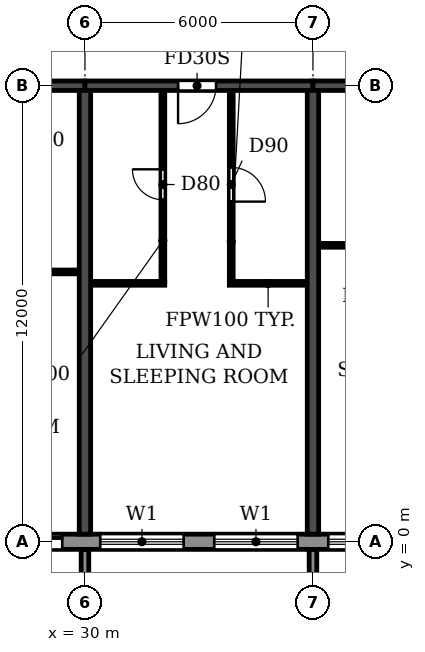
"""IFC4 building model, lengths in metres.
Left out: names, types, materials, properties, quantities, classifications, styles, units other than length and angle.
Written with IfcOpenShell. Run it as: python <this file> out.ifc"""

import sys

from ifc_helpers import new_model, si_unit, direction, frame, frame_2d, origin, place, context, subcontext, project, spatial, polyline, rectangle, outline, extrude, source, transform, mapped, element, fill, save


model = new_model("IFC4")
c1 = context("Model", 3, precision=1e-05, world=origin(), true_north=direction((0.0, 1.0)))
c2 = subcontext(c1, "Body", "Model", "MODEL_VIEW")
j1 = project(units=[si_unit("LENGTHUNIT", "METRE"), si_unit("PLANEANGLEUNIT", "RADIAN")], contexts=[c1])
p1 = place(None, origin())
s1 = spatial("IfcSite", under=j1, at=p1, CompositionType="ELEMENT")
p2 = place(p1, origin())
s2 = spatial("IfcBuilding", under=s1, at=p2, CompositionType="ELEMENT")
p3 = place(p2, frame((0.0, 0.0, 162.0)))
s3 = spatial("IfcBuildingStorey", under=s2, at=p3, CompositionType="ELEMENT", Elevation=162.0)
for number, where, z_axis, x_axis in (
    (1, (30.0, 0.2, 0.0), (0.0, 0.0, 1.0), (0.0, 1.0, 0.0)),
    (2, (36.0, 0.2, 0.0), (0.0, 0.0, 1.0), (0.0, 1.0, 0.0)),
):
    element("IfcWall", number, at=place(p3, frame(where, z_axis=z_axis, x_axis=x_axis)), inside=s3, PredefinedType="SHEAR", context=c2, shape_type="SweptSolid", body=[
        extrude(rectangle(XDim=11.675, YDim=0.3, at=frame_2d((5.837, 0.0))), origin(), (0.0, 0.0, 1.0), 2.95),
    ])
p4 = place(p3, frame((24.0, 12.0, 0.0), z_axis=(0.0, 0.0, 1.0), x_axis=(1.0, 0.0, 0.0)))
e3 = element("IfcWall", 3, at=p4, inside=s3, PredefinedType="SHEAR", context=c2, shape_type="SweptSolid", body=[
    extrude(rectangle(XDim=6.0, YDim=0.25, at=frame_2d((3.0, 0.0))), origin(), (0.0, 0.0, 1.0), 2.35),
])
p5 = place(p4, frame((2.55, 0.0, 0.0)))
e4 = element("IfcOpeningElement", 4, at=p5, cuts=e3, PredefinedType="OPENING", context=c2, shape_type="SweptSolid", body=[
    extrude(rectangle(XDim=1.0, YDim=2.1, at=frame_2d((0.5, 1.05))), frame((0.0, 0.135, 0.0), z_axis=(0.0, -1.0, 0.0), x_axis=(1.0, 0.0, 0.0)), (0.0, 0.0, 1.0), 0.27),
])
p6 = place(p3, frame((30.0, 12.0, 0.0), z_axis=(0.0, 0.0, 1.0), x_axis=(1.0, 0.0, 0.0)))
e5 = element("IfcWall", 5, at=p6, inside=s3, PredefinedType="SHEAR", context=c2, shape_type="SweptSolid", body=[
    extrude(rectangle(XDim=6.0, YDim=0.25, at=frame_2d((3.0, 0.0))), origin(), (0.0, 0.0, 1.0), 2.35),
])
p7 = place(p6, frame((2.45, 0.0, 0.0)))
e6 = element("IfcOpeningElement", 6, at=p7, cuts=e5, PredefinedType="OPENING", context=c2, shape_type="SweptSolid", body=[
    extrude(rectangle(XDim=1.0, YDim=2.1, at=frame_2d((0.5, 1.05))), frame((0.0, 0.135, 0.0), z_axis=(0.0, -1.0, 0.0), x_axis=(1.0, 0.0, 0.0)), (0.0, 0.0, 1.0), 0.27),
])
p8 = place(p3, frame((36.0, 12.0, 0.0), z_axis=(0.0, 0.0, 1.0), x_axis=(1.0, 0.0, 0.0)))
e7 = element("IfcWall", 7, at=p8, inside=s3, PredefinedType="SHEAR", context=c2, shape_type="SweptSolid", body=[
    extrude(rectangle(XDim=6.0, YDim=0.25, at=frame_2d((3.0, 0.0))), origin(), (0.0, 0.0, 1.0), 2.35),
])
p9 = place(p8, frame((2.45, 0.0, 0.0)))
e8 = element("IfcOpeningElement", 8, at=p9, cuts=e7, PredefinedType="OPENING", context=c2, shape_type="SweptSolid", body=[
    extrude(rectangle(XDim=1.0, YDim=2.1, at=frame_2d((0.5, 1.05))), frame((0.0, 0.135, 0.0), z_axis=(0.0, -1.0, 0.0), x_axis=(1.0, 0.0, 0.0)), (0.0, 0.0, 1.0), 0.27),
])
p10 = place(p3, frame((22.683, 0.0, 0.0), z_axis=(0.0, 0.0, 1.0), x_axis=(1.0, 0.0, 0.0)))
e9 = element("IfcWall", 9, at=p10, inside=s3, PredefinedType="STANDARD", context=c2, shape_type="SweptSolid", body=[
    extrude(rectangle(XDim=56.634, YDim=0.4, at=frame_2d((28.317, 0.0))), origin(), (0.0, 0.0, 1.0), 2.95),
])
p11 = place(p10, frame((1.717, 0.0, 0.9)))
e10 = element("IfcOpeningElement", 10, at=p11, cuts=e9, PredefinedType="OPENING", context=c2, shape_type="SweptSolid", body=[
    extrude(rectangle(XDim=2.2, YDim=1.5, at=frame_2d((1.1, 0.75))), frame((0.0, 0.21, 0.0), z_axis=(0.0, -1.0, 0.0), x_axis=(1.0, 0.0, 0.0)), (0.0, 0.0, 1.0), 0.42),
])
p12 = place(p10, frame((4.917, 0.0, 0.0)))
e11 = element("IfcOpeningElement", 11, at=p12, cuts=e9, PredefinedType="OPENING", context=c2, shape_type="SweptSolid", body=[
    extrude(rectangle(XDim=1.8, YDim=2.4, at=frame_2d((0.9, 1.2))), frame((0.0, 0.21, 0.0), z_axis=(0.0, -1.0, 0.0), x_axis=(1.0, 0.0, 0.0)), (0.0, 0.0, 1.0), 0.42),
])
p13 = place(p10, frame((7.717, 0.0, 0.9)))
e12 = element("IfcOpeningElement", 12, at=p13, cuts=e9, PredefinedType="OPENING", context=c2, shape_type="SweptSolid", body=[
    extrude(rectangle(XDim=2.2, YDim=1.5, at=frame_2d((1.1, 0.75))), frame((0.0, 0.21, 0.0), z_axis=(0.0, -1.0, 0.0), x_axis=(1.0, 0.0, 0.0)), (0.0, 0.0, 1.0), 0.42),
])
p14 = place(p10, frame((10.717, 0.0, 0.9)))
e13 = element("IfcOpeningElement", 13, at=p14, cuts=e9, PredefinedType="OPENING", context=c2, shape_type="SweptSolid", body=[
    extrude(rectangle(XDim=2.2, YDim=1.5, at=frame_2d((1.1, 0.75))), frame((0.0, 0.21, 0.0), z_axis=(0.0, -1.0, 0.0), x_axis=(1.0, 0.0, 0.0)), (0.0, 0.0, 1.0), 0.42),
])
p15 = place(p10, frame((13.717, 0.0, 0.9)))
e14 = element("IfcOpeningElement", 14, at=p15, cuts=e9, PredefinedType="OPENING", context=c2, shape_type="SweptSolid", body=[
    extrude(rectangle(XDim=2.2, YDim=1.5, at=frame_2d((1.1, 0.75))), frame((0.0, 0.21, 0.0), z_axis=(0.0, -1.0, 0.0), x_axis=(1.0, 0.0, 0.0)), (0.0, 0.0, 1.0), 0.42),
])
p16 = place(p10, frame((16.917, 0.0, 0.0)))
e15 = element("IfcOpeningElement", 15, at=p16, cuts=e9, PredefinedType="OPENING", context=c2, shape_type="SweptSolid", body=[
    extrude(rectangle(XDim=1.8, YDim=2.4, at=frame_2d((0.9, 1.2))), frame((0.0, 0.21, 0.0), z_axis=(0.0, -1.0, 0.0), x_axis=(1.0, 0.0, 0.0)), (0.0, 0.0, 1.0), 0.42),
])
p17 = place(p10, frame((19.717, 0.0, 0.9)))
e16 = element("IfcOpeningElement", 16, at=p17, cuts=e9, PredefinedType="OPENING", context=c2, shape_type="SweptSolid", body=[
    extrude(rectangle(XDim=2.2, YDim=1.5, at=frame_2d((1.1, 0.75))), frame((0.0, 0.21, 0.0), z_axis=(0.0, -1.0, 0.0), x_axis=(1.0, 0.0, 0.0)), (0.0, 0.0, 1.0), 0.42),
])
p18 = place(p10, frame((22.717, 0.0, 0.9)))
e17 = element("IfcOpeningElement", 17, at=p18, cuts=e9, PredefinedType="OPENING", context=c2, shape_type="SweptSolid", body=[
    extrude(rectangle(XDim=2.2, YDim=1.5, at=frame_2d((1.1, 0.75))), frame((0.0, 0.21, 0.0), z_axis=(0.0, -1.0, 0.0), x_axis=(1.0, 0.0, 0.0)), (0.0, 0.0, 1.0), 0.42),
])
p19 = place(p10, frame((25.717, 0.0, 0.9)))
e18 = element("IfcOpeningElement", 18, at=p19, cuts=e9, PredefinedType="OPENING", context=c2, shape_type="SweptSolid", body=[
    extrude(rectangle(XDim=2.2, YDim=1.5, at=frame_2d((1.1, 0.75))), frame((0.0, 0.21, 0.0), z_axis=(0.0, -1.0, 0.0), x_axis=(1.0, 0.0, 0.0)), (0.0, 0.0, 1.0), 0.42),
])
p20 = place(p10, frame((28.717, 0.0, 0.9)))
e19 = element("IfcOpeningElement", 19, at=p20, cuts=e9, PredefinedType="OPENING", context=c2, shape_type="SweptSolid", body=[
    extrude(rectangle(XDim=2.2, YDim=1.5, at=frame_2d((1.1, 0.75))), frame((0.0, 0.21, 0.0), z_axis=(0.0, -1.0, 0.0), x_axis=(1.0, 0.0, 0.0)), (0.0, 0.0, 1.0), 0.42),
])
p21 = place(p10, frame((31.717, 0.0, 0.9)))
e20 = element("IfcOpeningElement", 20, at=p21, cuts=e9, PredefinedType="OPENING", context=c2, shape_type="SweptSolid", body=[
    extrude(rectangle(XDim=2.2, YDim=1.5, at=frame_2d((1.1, 0.75))), frame((0.0, 0.21, 0.0), z_axis=(0.0, -1.0, 0.0), x_axis=(1.0, 0.0, 0.0)), (0.0, 0.0, 1.0), 0.42),
])
p22 = place(p10, frame((34.717, 0.0, 0.9)))
e21 = element("IfcOpeningElement", 21, at=p22, cuts=e9, PredefinedType="OPENING", context=c2, shape_type="SweptSolid", body=[
    extrude(rectangle(XDim=2.2, YDim=1.5, at=frame_2d((1.1, 0.75))), frame((0.0, 0.21, 0.0), z_axis=(0.0, -1.0, 0.0), x_axis=(1.0, 0.0, 0.0)), (0.0, 0.0, 1.0), 0.42),
])
p23 = place(p10, frame((37.717, 0.0, 0.9)))
e22 = element("IfcOpeningElement", 22, at=p23, cuts=e9, PredefinedType="OPENING", context=c2, shape_type="SweptSolid", body=[
    extrude(rectangle(XDim=2.2, YDim=1.5, at=frame_2d((1.1, 0.75))), frame((0.0, 0.21, 0.0), z_axis=(0.0, -1.0, 0.0), x_axis=(1.0, 0.0, 0.0)), (0.0, 0.0, 1.0), 0.42),
])
p24 = place(p10, frame((40.717, 0.0, 0.9)))
e23 = element("IfcOpeningElement", 23, at=p24, cuts=e9, PredefinedType="OPENING", context=c2, shape_type="SweptSolid", body=[
    extrude(rectangle(XDim=2.2, YDim=1.5, at=frame_2d((1.1, 0.75))), frame((0.0, 0.21, 0.0), z_axis=(0.0, -1.0, 0.0), x_axis=(1.0, 0.0, 0.0)), (0.0, 0.0, 1.0), 0.42),
])
p25 = place(p10, frame((43.717, 0.0, 0.9)))
e24 = element("IfcOpeningElement", 24, at=p25, cuts=e9, PredefinedType="OPENING", context=c2, shape_type="SweptSolid", body=[
    extrude(rectangle(XDim=2.2, YDim=1.5, at=frame_2d((1.1, 0.75))), frame((0.0, 0.21, 0.0), z_axis=(0.0, -1.0, 0.0), x_axis=(1.0, 0.0, 0.0)), (0.0, 0.0, 1.0), 0.42),
])
p26 = place(p10, frame((46.717, 0.0, 0.9)))
e25 = element("IfcOpeningElement", 25, at=p26, cuts=e9, PredefinedType="OPENING", context=c2, shape_type="SweptSolid", body=[
    extrude(rectangle(XDim=2.2, YDim=1.5, at=frame_2d((1.1, 0.75))), frame((0.0, 0.21, 0.0), z_axis=(0.0, -1.0, 0.0), x_axis=(1.0, 0.0, 0.0)), (0.0, 0.0, 1.0), 0.42),
])
p27 = place(p10, frame((49.917, 0.0, 0.0)))
e26 = element("IfcOpeningElement", 26, at=p27, cuts=e9, PredefinedType="OPENING", context=c2, shape_type="SweptSolid", body=[
    extrude(rectangle(XDim=1.8, YDim=2.4, at=frame_2d((0.9, 1.2))), frame((0.0, 0.21, 0.0), z_axis=(0.0, -1.0, 0.0), x_axis=(1.0, 0.0, 0.0)), (0.0, 0.0, 1.0), 0.42),
])
p28 = place(p10, frame((52.717, 0.0, 0.9)))
e27 = element("IfcOpeningElement", 27, at=p28, cuts=e9, PredefinedType="OPENING", context=c2, shape_type="SweptSolid", body=[
    extrude(rectangle(XDim=2.2, YDim=1.5, at=frame_2d((1.1, 0.75))), frame((0.0, 0.21, 0.0), z_axis=(0.0, -1.0, 0.0), x_axis=(1.0, 0.0, 0.0)), (0.0, 0.0, 1.0), 0.42),
])
m1 = source(origin(), c2, "Body", "SweptSolid", [
    extrude(outline(polyline([(0.0, 0.0), (0.2, 0.0), (0.2, 1.65), (0.0, 1.65), (0.0, 0.0)])), origin(), (0.0, 0.0, 1.0), 3.1),
])
for number, where in (
    (28, (29.9, -1.85, 0.0)),
    (29, (35.9, -1.85, 0.0)),
):
    element("IfcWall", number, at=place(p3, frame(where)), inside=s3, PredefinedType="STANDARD", context=c2, shape_type="MappedRepresentation", body=[
        mapped(m1, transform((0.0, 0.0, 0.0))),
    ])
p29 = place(p3, frame((30.16, 6.8, 0.0), z_axis=(0.0, 0.0, 1.0), x_axis=(1.0, 0.0, 0.0)))
e30 = element("IfcWall", 30, at=p29, inside=s3, PredefinedType="PARTITIONING", context=c2, shape_type="SweptSolid", body=[
    extrude(rectangle(XDim=1.94, YDim=0.1, at=frame_2d((0.97, 0.0))), origin(), (0.0, 0.0, 1.0), 2.95),
])
p30 = place(p3, frame((33.8, 6.8, 0.0), z_axis=(0.0, 0.0, 1.0), x_axis=(1.0, 0.0, 0.0)))
e31 = element("IfcWall", 31, at=p30, inside=s3, PredefinedType="PARTITIONING", context=c2, shape_type="SweptSolid", body=[
    extrude(rectangle(XDim=2.04, YDim=0.1, at=frame_2d((1.02, 0.0))), origin(), (0.0, 0.0, 1.0), 2.95),
])
for number, where, z_axis, x_axis in (
    (32, (27.9, 7.1, 0.0), (0.0, 0.0, 1.0), (1.0, 0.0, 0.0)),
    (33, (36.16, 7.8, 0.0), (0.0, 0.0, 1.0), (1.0, 0.0, 0.0)),
):
    element("IfcWall", number, at=place(p3, frame(where, z_axis=z_axis, x_axis=x_axis)), inside=s3, PredefinedType="PARTITIONING", context=c2, shape_type="SweptSolid", body=[
        extrude(rectangle(XDim=1.94, YDim=0.1, at=frame_2d((0.97, 0.0))), origin(), (0.0, 0.0, 1.0), 2.95),
    ])
p31 = place(p3, frame((32.05, 6.85, 0.0), z_axis=(0.0, 0.0, 1.0), x_axis=(0.0, 1.0, 0.0)))
e34 = element("IfcWall", 34, at=p31, inside=s3, PredefinedType="PARTITIONING", context=c2, shape_type="SweptSolid", body=[
    extrude(rectangle(XDim=5.015, YDim=0.1, at=frame_2d((2.507, 0.0))), origin(), (0.0, 0.0, 1.0), 2.95),
])
p32 = place(p31, frame((2.15, 0.0, 0.0)))
e35 = element("IfcOpeningElement", 35, at=p32, cuts=e34, PredefinedType="OPENING", context=c2, shape_type="SweptSolid", body=[
    extrude(rectangle(XDim=0.8, YDim=2.1, at=frame_2d((0.4, 1.05))), frame((0.0, 0.06, 0.0), z_axis=(0.0, -1.0, 0.0), x_axis=(1.0, 0.0, 0.0)), (0.0, 0.0, 1.0), 0.12),
])
p33 = place(p3, frame((33.85, 6.85, 0.0), z_axis=(0.0, 0.0, 1.0), x_axis=(0.0, 1.0, 0.0)))
e36 = element("IfcWall", 36, at=p33, inside=s3, PredefinedType="PARTITIONING", context=c2, shape_type="SweptSolid", body=[
    extrude(rectangle(XDim=5.015, YDim=0.1, at=frame_2d((2.507, 0.0))), origin(), (0.0, 0.0, 1.0), 2.95),
])
p34 = place(p33, frame((2.1, 0.0, 0.0)))
e37 = element("IfcOpeningElement", 37, at=p34, cuts=e36, PredefinedType="OPENING", context=c2, shape_type="SweptSolid", body=[
    extrude(rectangle(XDim=0.9, YDim=2.1, at=frame_2d((0.45, 1.05))), frame((0.0, 0.06, 0.0), z_axis=(0.0, -1.0, 0.0), x_axis=(1.0, 0.0, 0.0)), (0.0, 0.0, 1.0), 0.12),
])
p35 = place(p12, origin())
e38 = element("IfcDoor", 38, at=p35, inside=s3, OperationType="DOUBLE_DOOR_SLIDING", PredefinedType="DOOR", context=c2, shape_type="SweptSolid", body=[
    extrude(rectangle(XDim=1.8, YDim=2.4, at=frame_2d((0.9, 1.2))), frame((0.0, 0.025, 0.0), z_axis=(0.0, -1.0, 0.0), x_axis=(1.0, 0.0, 0.0)), (0.0, 0.0, 1.0), 0.05),
])
fill(e11, e38)
p36 = place(p13, origin())
e39 = element("IfcWindow", 39, at=p36, inside=s3, PartitioningType="DOUBLE_PANEL_HORIZONTAL", PredefinedType="WINDOW", context=c2, shape_type="SweptSolid", body=[
    extrude(rectangle(XDim=2.2, YDim=1.5, at=frame_2d((1.1, 0.75))), frame((0.0, 0.03, 0.0), z_axis=(0.0, -1.0, 0.0), x_axis=(1.0, 0.0, 0.0)), (0.0, 0.0, 1.0), 0.06),
])
fill(e12, e39)
p37 = place(p14, origin())
e40 = element("IfcWindow", 40, at=p37, inside=s3, PartitioningType="DOUBLE_PANEL_HORIZONTAL", PredefinedType="WINDOW", context=c2, shape_type="SweptSolid", body=[
    extrude(rectangle(XDim=2.2, YDim=1.5, at=frame_2d((1.1, 0.75))), frame((0.0, 0.03, 0.0), z_axis=(0.0, -1.0, 0.0), x_axis=(1.0, 0.0, 0.0)), (0.0, 0.0, 1.0), 0.06),
])
fill(e13, e40)
p38 = place(p15, origin())
e41 = element("IfcWindow", 41, at=p38, inside=s3, PartitioningType="DOUBLE_PANEL_HORIZONTAL", PredefinedType="WINDOW", context=c2, shape_type="SweptSolid", body=[
    extrude(rectangle(XDim=2.2, YDim=1.5, at=frame_2d((1.1, 0.75))), frame((0.0, 0.03, 0.0), z_axis=(0.0, -1.0, 0.0), x_axis=(1.0, 0.0, 0.0)), (0.0, 0.0, 1.0), 0.06),
])
fill(e14, e41)
p39 = place(p32, origin())
e42 = element("IfcDoor", 42, at=p39, inside=s3, OperationType="SINGLE_SWING_RIGHT", PredefinedType="DOOR", context=c2, shape_type="SweptSolid", body=[
    extrude(rectangle(XDim=0.8, YDim=2.1, at=frame_2d((0.4, 1.05))), frame((0.0, 0.025, 0.0), z_axis=(0.0, -1.0, 0.0), x_axis=(1.0, 0.0, 0.0)), (0.0, 0.0, 1.0), 0.05),
])
fill(e35, e42)
p40 = place(p7, frame((1.0, 0.0, 0.0), z_axis=(0.0, 0.0, 1.0), x_axis=(-1.0, 0.0, 0.0)))
e43 = element("IfcDoor", 43, at=p40, inside=s3, OperationType="SINGLE_SWING_RIGHT", PredefinedType="DOOR", context=c2, shape_type="SweptSolid", body=[
    extrude(rectangle(XDim=1.0, YDim=2.1, at=frame_2d((0.5, 1.05))), frame((0.0, 0.025, 0.0), z_axis=(0.0, -1.0, 0.0), x_axis=(1.0, 0.0, 0.0)), (0.0, 0.0, 1.0), 0.05),
])
fill(e6, e43)
p41 = place(p34, frame((0.9, 0.0, 0.0), z_axis=(0.0, 0.0, 1.0), x_axis=(-1.0, 0.0, 0.0)))
e44 = element("IfcDoor", 44, at=p41, inside=s3, OperationType="SINGLE_SWING_RIGHT", PredefinedType="DOOR", context=c2, shape_type="SweptSolid", body=[
    extrude(rectangle(XDim=0.9, YDim=2.1, at=frame_2d((0.45, 1.05))), frame((0.0, 0.025, 0.0), z_axis=(0.0, -1.0, 0.0), x_axis=(1.0, 0.0, 0.0)), (0.0, 0.0, 1.0), 0.05),
])
fill(e37, e44)
save(model, sys.argv[1])
